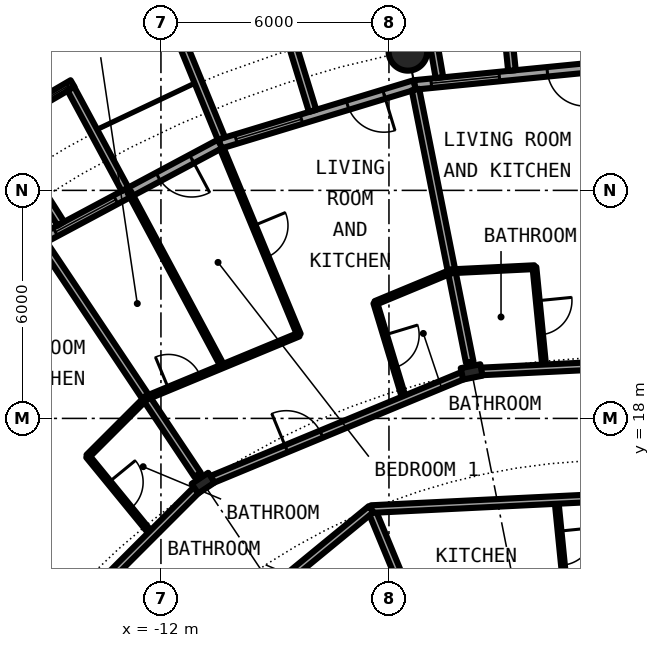
"""IFC4 building model, lengths in metres.
Left out: names, types, materials, properties, quantities, classifications, styles, units other than length and angle.
Written with IfcOpenShell. Run it as: python <this file> out.ifc"""

import sys

from ifc_helpers import new_model, si_unit, direction, frame, frame_2d, origin, origin_2d, place, context, subcontext, project, spatial, rectangle, circle, hollow_circle, i_section, extrude, element, fill, save


model = new_model("IFC4")
c1 = context("Model", 3, precision=1e-05, world=origin(), true_north=direction((0.0, 1.0)))
c2 = subcontext(c1, "Body", "Model", "MODEL_VIEW")
j1 = project(units=[si_unit("LENGTHUNIT", "METRE"), si_unit("PLANEANGLEUNIT", "RADIAN")], contexts=[c1])
p1 = place(None, origin())
s1 = spatial("IfcSite", under=j1, at=p1, CompositionType="ELEMENT")
p2 = place(p1, origin())
s2 = spatial("IfcBuilding", under=s1, at=p2, CompositionType="ELEMENT")
p3 = place(p2, frame((0.0, 0.0, 69.7)))
s3 = spatial("IfcBuildingStorey", under=s2, at=p3, CompositionType="ELEMENT", Elevation=69.7)
p4 = place(p3, frame((-5.501, 27.658, 0.0), z_axis=(0.0, 0.0, 1.0), x_axis=(1.0, 0.0, 0.0)))
e1 = element("IfcColumn", 1, at=p4, inside=s3, PredefinedType="COLUMN", context=c2, shape_type="SweptSolid", body=[
    extrude(hollow_circle(Radius=0.508, WallThickness=0.04, at=origin_2d()), origin(), (0.0, 0.0, 1.0), 3.05),
])
for number, where, z_axis, x_axis in (
    (2, (-3.824, 19.223, 0.0), (0.0, 0.0, 1.0), (-0.195, 0.981, 0.0)),
    (3, (-10.889, 16.297, 0.0), (0.0, 0.0, 1.0), (-0.556, 0.831, 0.0)),
):
    element("IfcColumn", number, at=place(p3, frame(where, z_axis=z_axis, x_axis=x_axis)), inside=s3, PredefinedType="COLUMN", context=c2, shape_type="SweptSolid", body=[
        extrude(i_section(OverallWidth=0.306, OverallDepth=0.524, WebThickness=0.021, FlangeThickness=0.04, FilletRadius=0.027, at=origin_2d()), origin(), (0.0, 0.0, 1.0), 3.05),
    ])
p5 = place(p3, frame((0.0, 27.3, 0.0), z_axis=(0.0, 0.0, 1.0), x_axis=(-0.995173996315, -0.098126026407, 0.0)))
e4 = element("IfcWall", 4, at=p5, inside=s3, PredefinedType="SOLIDWALL", context=c2, shape_type="SweptSolid", body=[
    extrude(rectangle(XDim=5.352, YDim=0.25, at=frame_2d((2.676, 0.0))), origin(), (0.0, 0.0, 1.0), 2.7),
])
p6 = place(p5, frame((0.841, 0.0, 0.0)))
e5 = element("IfcOpeningElement", 5, at=p6, cuts=e4, PredefinedType="OPENING", context=c2, shape_type="SweptSolid", body=[
    extrude(rectangle(XDim=1.0, YDim=2.2, at=frame_2d((0.5, 1.1))), frame((0.0, 0.135, 0.0), z_axis=(0.0, -1.0, 0.0), x_axis=(1.0, 0.0, 0.0)), (0.0, 0.0, 1.0), 0.27),
])
p7 = place(p5, frame((3.111, 0.0, 0.3)))
e6 = element("IfcOpeningElement", 6, at=p7, cuts=e4, PredefinedType="OPENING", context=c2, shape_type="SweptSolid", body=[
    extrude(rectangle(XDim=1.8, YDim=2.1, at=frame_2d((0.9, 1.05))), frame((0.0, 0.135, 0.0), z_axis=(0.0, -1.0, 0.0), x_axis=(1.0, 0.0, 0.0)), (0.0, 0.0, 1.0), 0.27),
])
p8 = place(p3, frame((-2.764, 27.153, -0.03), z_axis=(0.0, 0.0, 1.0), x_axis=(-0.101505487237, 0.994834979311, 0.0)))
e7 = element("IfcWall", 7, at=p8, inside=s3, PredefinedType="SOLIDWALL", context=c2, shape_type="SweptSolid", body=[
    extrude(rectangle(XDim=3.007, YDim=0.2, at=frame_2d((1.503, 0.0))), origin(), (0.0, 0.0, 1.0), 2.73),
])
p9 = place(p3, frame((-4.671, 26.966, -0.03), z_axis=(0.0, 0.0, 1.0), x_axis=(-0.170539878907, 0.985350774954, 0.0)))
e8 = element("IfcWall", 8, at=p9, inside=s3, PredefinedType="SOLIDWALL", context=c2, shape_type="SweptSolid", body=[
    extrude(rectangle(XDim=2.932, YDim=0.2, at=frame_2d((1.466, 0.0))), origin(), (0.0, 0.0, 1.0), 2.73),
])
p10 = place(p3, frame((-5.326, 26.775, 0.0), z_axis=(0.0, 0.0, 1.0), x_axis=(-0.956965678721, -0.290201119486, 0.0)))
e9 = element("IfcWall", 9, at=p10, inside=s3, PredefinedType="SOLIDWALL", context=c2, shape_type="SweptSolid", body=[
    extrude(rectangle(XDim=5.351, YDim=0.25, at=frame_2d((2.676, 0.0))), origin(), (0.0, 0.0, 1.0), 2.7),
])
p11 = place(p10, frame((0.841, 0.0, 0.0)))
e10 = element("IfcOpeningElement", 10, at=p11, cuts=e9, PredefinedType="OPENING", context=c2, shape_type="SweptSolid", body=[
    extrude(rectangle(XDim=1.0, YDim=2.2, at=frame_2d((0.5, 1.1))), frame((0.0, 0.135, 0.0), z_axis=(0.0, -1.0, 0.0), x_axis=(1.0, 0.0, 0.0)), (0.0, 0.0, 1.0), 0.27),
])
p12 = place(p10, frame((3.111, 0.0, 0.3)))
e11 = element("IfcOpeningElement", 11, at=p12, cuts=e9, PredefinedType="OPENING", context=c2, shape_type="SweptSolid", body=[
    extrude(rectangle(XDim=1.8, YDim=2.1, at=frame_2d((0.9, 1.05))), frame((0.0, 0.135, 0.0), z_axis=(0.0, -1.0, 0.0), x_axis=(1.0, 0.0, 0.0)), (0.0, 0.0, 1.0), 0.27),
])
p13 = place(p3, frame((-8.009, 26.092, -0.03), z_axis=(0.0, 0.0, 1.0), x_axis=(-0.293406695073, 0.955987715029, 0.0)))
e12 = element("IfcWall", 12, at=p13, inside=s3, PredefinedType="SOLIDWALL", context=c2, shape_type="SweptSolid", body=[
    extrude(rectangle(XDim=3.006, YDim=0.2, at=frame_2d((1.503, 0.0))), origin(), (0.0, 0.0, 1.0), 2.73),
])
p14 = place(p3, frame((-10.409, 25.364, -0.03), z_axis=(0.0, 0.0, 1.0), x_axis=(-0.379509886562, 0.925187681501, 0.0)))
e13 = element("IfcWall", 13, at=p14, inside=s3, PredefinedType="SOLIDWALL", context=c2, shape_type="SweptSolid", body=[
    extrude(rectangle(XDim=2.883, YDim=0.2, at=frame_2d((1.441, 0.0))), origin(), (0.0, 0.0, 1.0), 2.73),
])
p15 = place(p3, frame((-10.447, 25.222, 0.0), z_axis=(0.0, 0.0, 1.0), x_axis=(-0.881915646801, -0.471407246368, 0.0)))
e14 = element("IfcWall", 14, at=p15, inside=s3, PredefinedType="SOLIDWALL", context=c2, shape_type="SweptSolid", body=[
    extrude(rectangle(XDim=5.352, YDim=0.25, at=frame_2d((2.676, 0.0))), origin(), (0.0, 0.0, 1.0), 2.7),
])
p16 = place(p15, frame((0.841, 0.0, 0.0)))
e15 = element("IfcOpeningElement", 15, at=p16, cuts=e14, PredefinedType="OPENING", context=c2, shape_type="SweptSolid", body=[
    extrude(rectangle(XDim=1.0, YDim=2.2, at=frame_2d((0.5, 1.1))), frame((0.0, 0.135, 0.0), z_axis=(0.0, -1.0, 0.0), x_axis=(1.0, 0.0, 0.0)), (0.0, 0.0, 1.0), 0.27),
])
p17 = place(p15, frame((3.111, 0.0, 0.3)))
e16 = element("IfcOpeningElement", 16, at=p17, cuts=e14, PredefinedType="OPENING", context=c2, shape_type="SweptSolid", body=[
    extrude(rectangle(XDim=1.8, YDim=2.1, at=frame_2d((0.9, 1.05))), frame((0.0, 0.135, 0.0), z_axis=(0.0, -1.0, 0.0), x_axis=(1.0, 0.0, 0.0)), (0.0, 0.0, 1.0), 0.27),
])
p18 = place(p3, frame((-14.327, 26.812, -0.03), z_axis=(0.0, 0.0, 1.0), x_axis=(-0.863346521872, -0.504611517081, 0.0)))
e17 = element("IfcWall", 17, at=p18, inside=s3, PredefinedType="SOLIDWALL", context=c2, shape_type="SweptSolid", body=[
    extrude(rectangle(XDim=2.336, YDim=0.2, at=frame_2d((1.168, 0.0))), origin(), (0.0, 0.0, 1.0), 2.73),
])
p19 = place(p18, frame((0.128, 0.0, 0.33)))
e18 = element("IfcOpeningElement", 18, at=p19, cuts=e17, PredefinedType="OPENING", context=c2, shape_type="SweptSolid", body=[
    extrude(circle(Radius=1.04, at=frame_2d((1.04, 1.04))), frame((0.0, 0.11, 0.0), z_axis=(0.0, -1.0, 0.0), x_axis=(1.0, 0.0, 0.0)), (0.0, 0.0, 1.0), 0.22),
])
p20 = place(p3, frame((-12.945, 24.029, -0.03), z_axis=(0.0, 0.0, 1.0), x_axis=(-0.474424310775, 0.88029629861, 0.0)))
e19 = element("IfcWall", 19, at=p20, inside=s3, PredefinedType="SOLIDWALL", context=c2, shape_type="SweptSolid", body=[
    extrude(rectangle(XDim=3.006, YDim=0.2, at=frame_2d((1.503, 0.0))), origin(), (0.0, 0.0, 1.0), 2.73),
])
p21 = place(p3, frame((-14.635, 23.126, -0.03), z_axis=(0.0, 0.0, 1.0), x_axis=(-0.534437802731, 0.845207805816, 0.0)))
e20 = element("IfcWall", 20, at=p21, inside=s3, PredefinedType="SOLIDWALL", context=c2, shape_type="SweptSolid", body=[
    extrude(rectangle(XDim=2.932, YDim=0.2, at=frame_2d((1.466, 0.0))), origin(), (0.0, 0.0, 1.0), 2.73),
])
p22 = place(p3, frame((-15.097, 22.595, 0.0), z_axis=(0.0, 0.0, 1.0), x_axis=(0.555516661303, -0.831505405283, 0.0)))
e21 = element("IfcWall", 21, at=p22, inside=s3, PredefinedType="PARTITIONING", context=c2, shape_type="SweptSolid", body=[
    extrude(rectangle(XDim=7.312, YDim=0.2, at=frame_2d((3.656, 0.0))), origin(), (0.0, 0.0, 1.0), 2.7),
])
p23 = place(p3, frame((-13.927, 17.004, 0.0), z_axis=(0.0, 0.0, 1.0), x_axis=(0.633582447834, -0.77367517848, 0.0)))
e22 = element("IfcWall", 22, at=p23, inside=s3, PredefinedType="PARTITIONING", context=c2, shape_type="SweptSolid", body=[
    extrude(rectangle(XDim=2.661, YDim=0.1, at=frame_2d((1.331, 0.0))), origin(), (0.0, 0.0, 1.0), 2.7),
])
p24 = place(p23, frame((0.881, 0.0, 0.0)))
e23 = element("IfcOpeningElement", 23, at=p24, cuts=e22, PredefinedType="OPENING", context=c2, shape_type="SweptSolid", body=[
    extrude(rectangle(XDim=0.9, YDim=2.3, at=frame_2d((0.45, 1.15))), frame((0.0, 0.06, 0.0), z_axis=(0.0, -1.0, 0.0), x_axis=(1.0, 0.0, 0.0)), (0.0, 0.0, 1.0), 0.12),
])
p25 = place(p3, frame((-12.833, 23.954, 0.0), z_axis=(0.0, 0.0, 1.0), x_axis=(0.472148388886, -0.881519085938, 0.0)))
e24 = element("IfcWall", 24, at=p25, inside=s3, PredefinedType="PARTITIONING", context=c2, shape_type="SweptSolid", body=[
    extrude(rectangle(XDim=5.196, YDim=0.1, at=frame_2d((2.598, 0.0))), origin(), (0.0, 0.0, 1.0), 2.7),
])
p26 = place(p3, frame((-10.399, 25.106, 0.0), z_axis=(0.0, 0.0, 1.0), x_axis=(0.382620183578, -0.92390572848, 0.0)))
e25 = element("IfcWall", 25, at=p26, inside=s3, PredefinedType="PARTITIONING", context=c2, shape_type="SweptSolid", body=[
    extrude(rectangle(XDim=5.302, YDim=0.1, at=frame_2d((2.651, 0.0))), origin(), (0.0, 0.0, 1.0), 2.7),
])
p27 = place(p26, frame((2.201, 0.0, 0.0)))
e26 = element("IfcOpeningElement", 26, at=p27, cuts=e25, PredefinedType="OPENING", context=c2, shape_type="SweptSolid", body=[
    extrude(rectangle(XDim=0.9, YDim=2.3, at=frame_2d((0.45, 1.15))), frame((0.0, 0.06, 0.0), z_axis=(0.0, -1.0, 0.0), x_axis=(1.0, 0.0, 0.0)), (0.0, 0.0, 1.0), 0.12),
])
p28 = place(p3, frame((-6.468, 15.614, 0.0), z_axis=(0.0, 0.0, 1.0), x_axis=(0.382646942224, -0.923894646378, 0.0)))
e27 = element("IfcWall", 27, at=p28, inside=s3, PredefinedType="PARTITIONING", context=c2, shape_type="SweptSolid", body=[
    extrude(rectangle(XDim=9.181, YDim=0.2, at=frame_2d((4.59, 0.0))), origin(), (0.0, 0.0, 1.0), 2.7),
])
p29 = place(p3, frame((-6.36, 21.039, 0.0), z_axis=(0.0, 0.0, 1.0), x_axis=(0.289375816213, -0.957215564537, 0.0)))
e28 = element("IfcWall", 28, at=p29, inside=s3, PredefinedType="PARTITIONING", context=c2, shape_type="SweptSolid", body=[
    extrude(rectangle(XDim=2.661, YDim=0.1, at=frame_2d((1.331, 0.0))), origin(), (0.0, 0.0, 1.0), 2.7),
])
p30 = place(p29, frame((0.88, 0.0, 0.0)))
e29 = element("IfcOpeningElement", 29, at=p30, cuts=e28, PredefinedType="OPENING", context=c2, shape_type="SweptSolid", body=[
    extrude(rectangle(XDim=0.9, YDim=2.3, at=frame_2d((0.45, 1.15))), frame((0.0, 0.06, 0.0), z_axis=(0.0, -1.0, 0.0), x_axis=(1.0, 0.0, 0.0)), (0.0, 0.0, 1.0), 0.12),
])
p31 = place(p3, frame((-5.302, 26.653, 0.0), z_axis=(0.0, 0.0, 1.0), x_axis=(0.195114589291, -0.98078045303, 0.0)))
e30 = element("IfcWall", 30, at=p31, inside=s3, PredefinedType="PARTITIONING", context=c2, shape_type="SweptSolid", body=[
    extrude(rectangle(XDim=7.314, YDim=0.2, at=frame_2d((3.657, 0.0))), origin(), (0.0, 0.0, 1.0), 2.7),
])
p32 = place(p3, frame((-2.172, 21.979, 0.0), z_axis=(0.0, 0.0, 1.0), x_axis=(0.098383180323, -0.995148606907, 0.0)))
e31 = element("IfcWall", 31, at=p32, inside=s3, PredefinedType="PARTITIONING", context=c2, shape_type="SweptSolid", body=[
    extrude(rectangle(XDim=2.675, YDim=0.1, at=frame_2d((1.337, 0.0))), origin(), (0.0, 0.0, 1.0), 2.7),
])
p33 = place(p32, frame((0.887, 0.0, 0.0)))
e32 = element("IfcOpeningElement", 32, at=p33, cuts=e31, PredefinedType="OPENING", context=c2, shape_type="SweptSolid", body=[
    extrude(rectangle(XDim=0.9, YDim=2.3, at=frame_2d((0.45, 1.15))), frame((0.0, 0.06, 0.0), z_axis=(0.0, -1.0, 0.0), x_axis=(1.0, 0.0, 0.0)), (0.0, 0.0, 1.0), 0.12),
])
p34 = place(p3, frame((-1.593, 15.853, 0.0), z_axis=(0.0, 0.0, 1.0), x_axis=(0.099730339513, -0.995014502096, 0.0)))
e33 = element("IfcWall", 33, at=p34, inside=s3, PredefinedType="PARTITIONING", context=c2, shape_type="SweptSolid", body=[
    extrude(rectangle(XDim=8.213, YDim=0.1, at=frame_2d((4.106, 0.0))), origin(), (0.0, 0.0, 1.0), 2.7),
])
p35 = place(p34, frame((0.823, 0.0, 0.0)))
e34 = element("IfcOpeningElement", 34, at=p35, cuts=e33, PredefinedType="OPENING", context=c2, shape_type="SweptSolid", body=[
    extrude(rectangle(XDim=0.9, YDim=2.3, at=frame_2d((0.45, 1.15))), frame((0.0, 0.06, 0.0), z_axis=(0.0, -1.0, 0.0), x_axis=(1.0, 0.0, 0.0)), (0.0, 0.0, 1.0), 0.12),
])
p36 = place(p34, frame((4.929, 0.0, 0.0)))
e35 = element("IfcOpeningElement", 35, at=p36, cuts=e33, PredefinedType="OPENING", context=c2, shape_type="SweptSolid", body=[
    extrude(rectangle(XDim=0.9, YDim=2.3, at=frame_2d((0.45, 1.15))), frame((0.0, 0.06, 0.0), z_axis=(0.0, -1.0, 0.0), x_axis=(1.0, 0.0, 0.0)), (0.0, 0.0, 1.0), 0.12),
])
p37 = place(p3, frame((-6.468, 15.614, 0.0), z_axis=(0.0, 0.0, 1.0), x_axis=(0.998797695979, 0.049022061427, 0.0)))
e36 = element("IfcWall", 36, at=p37, inside=s3, PredefinedType="PARTITIONING", context=c2, shape_type="SweptSolid", body=[
    extrude(rectangle(XDim=11.385, YDim=0.2, at=frame_2d((5.692, 0.0))), origin(), (0.0, 0.0, 1.0), 2.7),
])
p38 = place(p37, frame((6.008, 0.0, 0.0)))
e37 = element("IfcOpeningElement", 37, at=p38, cuts=e36, PredefinedType="OPENING", context=c2, shape_type="SweptSolid", body=[
    extrude(rectangle(XDim=1.0, YDim=2.3, at=frame_2d((0.5, 1.15))), frame((0.0, 0.11, 0.0), z_axis=(0.0, -1.0, 0.0), x_axis=(1.0, 0.0, 0.0)), (0.0, 0.0, 1.0), 0.22),
])
p39 = place(p3, frame((-14.052, 9.389, 0.0), z_axis=(0.0, 0.0, 1.0), x_axis=(0.77292501819, 0.634497372931, 0.0)))
e38 = element("IfcWall", 38, at=p39, inside=s3, PredefinedType="PARTITIONING", context=c2, shape_type="SweptSolid", body=[
    extrude(rectangle(XDim=9.81, YDim=0.2, at=frame_2d((4.905, 0.0))), origin(), (0.0, 0.0, 1.0), 2.7),
])
p40 = place(p39, frame((4.406, 0.0, 0.0)))
e39 = element("IfcOpeningElement", 39, at=p40, cuts=e38, PredefinedType="OPENING", context=c2, shape_type="SweptSolid", body=[
    extrude(rectangle(XDim=1.0, YDim=2.3, at=frame_2d((0.5, 1.15))), frame((0.0, 0.11, 0.0), z_axis=(0.0, -1.0, 0.0), x_axis=(1.0, 0.0, 0.0)), (0.0, 0.0, 1.0), 0.22),
])
p41 = place(p3, frame((-16.186, 11.0, 0.0), z_axis=(0.0, 0.0, 1.0), x_axis=(0.707106781187, 0.707106781187, 0.0)))
e40 = element("IfcWall", 40, at=p41, inside=s3, PredefinedType="PARTITIONING", context=c2, shape_type="SweptSolid", body=[
    extrude(rectangle(XDim=7.334, YDim=0.2, at=frame_2d((3.667, 0.0))), origin(), (0.0, 0.0, 1.0), 2.38),
])
p42 = place(p41, frame((2.211, 0.0, 0.0)))
e41 = element("IfcOpeningElement", 41, at=p42, cuts=e40, PredefinedType="OPENING", context=c2, shape_type="SweptSolid", body=[
    extrude(rectangle(XDim=1.0, YDim=2.3, at=frame_2d((0.5, 1.15))), frame((0.0, 0.11, 0.0), z_axis=(0.0, -1.0, 0.0), x_axis=(1.0, 0.0, 0.0)), (0.0, 0.0, 1.0), 0.22),
])
p43 = place(p3, frame((-10.745, 16.357, 0.0), z_axis=(0.0, 0.0, 1.0), x_axis=(0.923928411035, 0.382565407848, 0.0)))
e42 = element("IfcWall", 42, at=p43, inside=s3, PredefinedType="PARTITIONING", context=c2, shape_type="SweptSolid", body=[
    extrude(rectangle(XDim=7.335, YDim=0.2, at=frame_2d((3.667, 0.0))), origin(), (0.0, 0.0, 1.0), 2.38),
])
p44 = place(p43, frame((2.212, 0.0, 0.0)))
e43 = element("IfcOpeningElement", 43, at=p44, cuts=e42, PredefinedType="OPENING", context=c2, shape_type="SweptSolid", body=[
    extrude(rectangle(XDim=1.0, YDim=2.3, at=frame_2d((0.5, 1.15))), frame((0.0, 0.11, 0.0), z_axis=(0.0, -1.0, 0.0), x_axis=(1.0, 0.0, 0.0)), (0.0, 0.0, 1.0), 0.22),
])
p45 = place(p3, frame((-3.669, 19.231, 0.0), z_axis=(0.0, 0.0, 1.0), x_axis=(0.998803644396, 0.048900715146, 0.0)))
e44 = element("IfcWall", 44, at=p45, inside=s3, PredefinedType="PARTITIONING", context=c2, shape_type="SweptSolid", body=[
    extrude(rectangle(XDim=5.602, YDim=0.2, at=frame_2d((2.801, 0.0))), origin(), (0.0, 0.0, 1.0), 2.38),
])
p46 = place(p45, frame((3.179, 0.0, 0.0)))
e45 = element("IfcOpeningElement", 45, at=p46, cuts=e44, PredefinedType="OPENING", context=c2, shape_type="SweptSolid", body=[
    extrude(rectangle(XDim=1.0, YDim=2.3, at=frame_2d((0.5, 1.15))), frame((0.0, 0.11, 0.0), z_axis=(0.0, -1.0, 0.0), x_axis=(1.0, 0.0, 0.0)), (0.0, 0.0, 1.0), 0.22),
])
p47 = place(p3, frame((-13.924, 17.006, 0.0), z_axis=(0.0, 0.0, 1.0), x_axis=(0.707387256653, 0.706826194425, 0.0)))
e46 = element("IfcWall", 46, at=p47, inside=s3, PredefinedType="PARTITIONING", context=c2, shape_type="SweptSolid", body=[
    extrude(rectangle(XDim=2.176, YDim=0.1, at=frame_2d((1.088, 0.0))), origin(), (0.0, 0.0, 1.0), 2.7),
])
p48 = place(p3, frame((-12.397, 18.536, 0.0), z_axis=(0.0, 0.0, 1.0), x_axis=(0.923761942059, 0.382967197554, 0.0)))
e47 = element("IfcWall", 47, at=p48, inside=s3, PredefinedType="PARTITIONING", context=c2, shape_type="SweptSolid", body=[
    extrude(rectangle(XDim=4.356, YDim=0.1, at=frame_2d((2.178, 0.0))), origin(), (0.0, 0.0, 1.0), 2.7),
])
p49 = place(p48, frame((0.646, 0.0, 0.0)))
e48 = element("IfcOpeningElement", 48, at=p49, cuts=e47, PredefinedType="OPENING", context=c2, shape_type="SweptSolid", body=[
    extrude(rectangle(XDim=0.9, YDim=2.3, at=frame_2d((0.45, 1.15))), frame((0.0, 0.06, 0.0), z_axis=(0.0, -1.0, 0.0), x_axis=(1.0, 0.0, 0.0)), (0.0, 0.0, 1.0), 0.12),
])
p50 = place(p3, frame((-6.36, 21.039, 0.0), z_axis=(0.0, 0.0, 1.0), x_axis=(0.923743082263, 0.383012686436, 0.0)))
e49 = element("IfcWall", 49, at=p50, inside=s3, PredefinedType="PARTITIONING", context=c2, shape_type="SweptSolid", body=[
    extrude(rectangle(XDim=2.175, YDim=0.1, at=frame_2d((1.087, 0.0))), origin(), (0.0, 0.0, 1.0), 2.7),
])
p51 = place(p3, frame((-4.351, 21.872, 0.0), z_axis=(0.0, 0.0, 1.0), x_axis=(0.998797962079, 0.049016639484, 0.0)))
e50 = element("IfcWall", 50, at=p51, inside=s3, PredefinedType="PARTITIONING", context=c2, shape_type="SweptSolid", body=[
    extrude(rectangle(XDim=2.182, YDim=0.1, at=frame_2d((1.091, 0.0))), origin(), (0.0, 0.0, 1.0), 2.7),
])
p52 = place(p6, origin())
e51 = element("IfcDoor", 51, at=p52, inside=s3, OperationType="SINGLE_SWING_LEFT", PredefinedType="DOOR", context=c2, shape_type="SweptSolid", body=[
    extrude(rectangle(XDim=1.0, YDim=2.2, at=frame_2d((0.5, 1.1))), frame((0.0, 0.025, 0.0), z_axis=(0.0, -1.0, 0.0), x_axis=(1.0, 0.0, 0.0)), (0.0, 0.0, 1.0), 0.05),
])
fill(e5, e51)
p53 = place(p7, origin())
e52 = element("IfcWindow", 52, at=p53, inside=s3, PartitioningType="SINGLE_PANEL", PredefinedType="WINDOW", context=c2, shape_type="SweptSolid", body=[
    extrude(rectangle(XDim=1.8, YDim=2.1, at=frame_2d((0.9, 1.05))), frame((0.0, 0.03, 0.0), z_axis=(0.0, -1.0, 0.0), x_axis=(1.0, 0.0, 0.0)), (0.0, 0.0, 1.0), 0.06),
])
fill(e6, e52)
p54 = place(p11, origin())
e53 = element("IfcDoor", 53, at=p54, inside=s3, OperationType="SINGLE_SWING_LEFT", PredefinedType="DOOR", context=c2, shape_type="SweptSolid", body=[
    extrude(rectangle(XDim=1.0, YDim=2.2, at=frame_2d((0.5, 1.1))), frame((0.0, 0.025, 0.0), z_axis=(0.0, -1.0, 0.0), x_axis=(1.0, 0.0, 0.0)), (0.0, 0.0, 1.0), 0.05),
])
fill(e10, e53)
p55 = place(p12, origin())
e54 = element("IfcWindow", 54, at=p55, inside=s3, PartitioningType="SINGLE_PANEL", PredefinedType="WINDOW", context=c2, shape_type="SweptSolid", body=[
    extrude(rectangle(XDim=1.8, YDim=2.1, at=frame_2d((0.9, 1.05))), frame((0.0, 0.03, 0.0), z_axis=(0.0, -1.0, 0.0), x_axis=(1.0, 0.0, 0.0)), (0.0, 0.0, 1.0), 0.06),
])
fill(e11, e54)
p56 = place(p16, origin())
e55 = element("IfcDoor", 55, at=p56, inside=s3, OperationType="SINGLE_SWING_LEFT", PredefinedType="DOOR", context=c2, shape_type="SweptSolid", body=[
    extrude(rectangle(XDim=1.0, YDim=2.2, at=frame_2d((0.5, 1.1))), frame((0.0, 0.025, 0.0), z_axis=(0.0, -1.0, 0.0), x_axis=(1.0, 0.0, 0.0)), (0.0, 0.0, 1.0), 0.05),
])
fill(e15, e55)
p57 = place(p17, origin())
e56 = element("IfcWindow", 56, at=p57, inside=s3, PartitioningType="SINGLE_PANEL", PredefinedType="WINDOW", context=c2, shape_type="SweptSolid", body=[
    extrude(rectangle(XDim=1.8, YDim=2.1, at=frame_2d((0.9, 1.05))), frame((0.0, 0.03, 0.0), z_axis=(0.0, -1.0, 0.0), x_axis=(1.0, 0.0, 0.0)), (0.0, 0.0, 1.0), 0.06),
])
fill(e16, e56)
p58 = place(p19, origin())
e57 = element("IfcWindow", 57, at=p58, inside=s3, PartitioningType="SINGLE_PANEL", PredefinedType="WINDOW", context=c2, shape_type="SweptSolid", body=[
    extrude(circle(Radius=1.04, at=frame_2d((1.04, 1.04))), frame((0.0, 0.03, 0.0), z_axis=(0.0, -1.0, 0.0), x_axis=(1.0, 0.0, 0.0)), (0.0, 0.0, 1.0), 0.06),
])
fill(e18, e57)
p59 = place(p33, origin())
e58 = element("IfcDoor", 58, at=p59, inside=s3, OperationType="SINGLE_SWING_RIGHT", PredefinedType="DOOR", context=c2, shape_type="SweptSolid", body=[
    extrude(rectangle(XDim=0.9, YDim=2.3, at=frame_2d((0.45, 1.15))), frame((0.0, 0.025, 0.0), z_axis=(0.0, -1.0, 0.0), x_axis=(1.0, 0.0, 0.0)), (0.0, 0.0, 1.0), 0.05),
])
fill(e32, e58)
p60 = place(p44, origin())
e59 = element("IfcDoor", 59, at=p60, inside=s3, OperationType="SINGLE_SWING_LEFT", PredefinedType="DOOR", context=c2, shape_type="SweptSolid", body=[
    extrude(rectangle(XDim=1.0, YDim=2.3, at=frame_2d((0.5, 1.15))), frame((0.0, 0.025, 0.0), z_axis=(0.0, -1.0, 0.0), x_axis=(1.0, 0.0, 0.0)), (0.0, 0.0, 1.0), 0.05),
])
fill(e43, e59)
p61 = place(p30, origin())
e60 = element("IfcDoor", 60, at=p61, inside=s3, OperationType="SINGLE_SWING_LEFT", PredefinedType="DOOR", context=c2, shape_type="SweptSolid", body=[
    extrude(rectangle(XDim=0.9, YDim=2.3, at=frame_2d((0.45, 1.15))), frame((0.0, 0.025, 0.0), z_axis=(0.0, -1.0, 0.0), x_axis=(1.0, 0.0, 0.0)), (0.0, 0.0, 1.0), 0.05),
])
fill(e29, e60)
p62 = place(p27, origin())
e61 = element("IfcDoor", 61, at=p62, inside=s3, OperationType="SINGLE_SWING_LEFT", PredefinedType="DOOR", context=c2, shape_type="SweptSolid", body=[
    extrude(rectangle(XDim=0.9, YDim=2.3, at=frame_2d((0.45, 1.15))), frame((0.0, 0.025, 0.0), z_axis=(0.0, -1.0, 0.0), x_axis=(1.0, 0.0, 0.0)), (0.0, 0.0, 1.0), 0.05),
])
fill(e26, e61)
p63 = place(p49, origin())
e62 = element("IfcDoor", 62, at=p63, inside=s3, OperationType="SINGLE_SWING_LEFT", PredefinedType="DOOR", context=c2, shape_type="SweptSolid", body=[
    extrude(rectangle(XDim=0.9, YDim=2.3, at=frame_2d((0.45, 1.15))), frame((0.0, 0.025, 0.0), z_axis=(0.0, -1.0, 0.0), x_axis=(1.0, 0.0, 0.0)), (0.0, 0.0, 1.0), 0.05),
])
fill(e48, e62)
p64 = place(p24, origin())
e63 = element("IfcDoor", 63, at=p64, inside=s3, OperationType="SINGLE_SWING_RIGHT", PredefinedType="DOOR", context=c2, shape_type="SweptSolid", body=[
    extrude(rectangle(XDim=0.9, YDim=2.3, at=frame_2d((0.45, 1.15))), frame((0.0, 0.025, 0.0), z_axis=(0.0, -1.0, 0.0), x_axis=(1.0, 0.0, 0.0)), (0.0, 0.0, 1.0), 0.05),
])
fill(e23, e63)
p65 = place(p35, origin())
e64 = element("IfcDoor", 64, at=p65, inside=s3, OperationType="SINGLE_SWING_LEFT", PredefinedType="DOOR", context=c2, shape_type="SweptSolid", body=[
    extrude(rectangle(XDim=0.9, YDim=2.3, at=frame_2d((0.45, 1.15))), frame((0.0, 0.025, 0.0), z_axis=(0.0, -1.0, 0.0), x_axis=(1.0, 0.0, 0.0)), (0.0, 0.0, 1.0), 0.05),
])
fill(e34, e64)
save(model, sys.argv[1])
